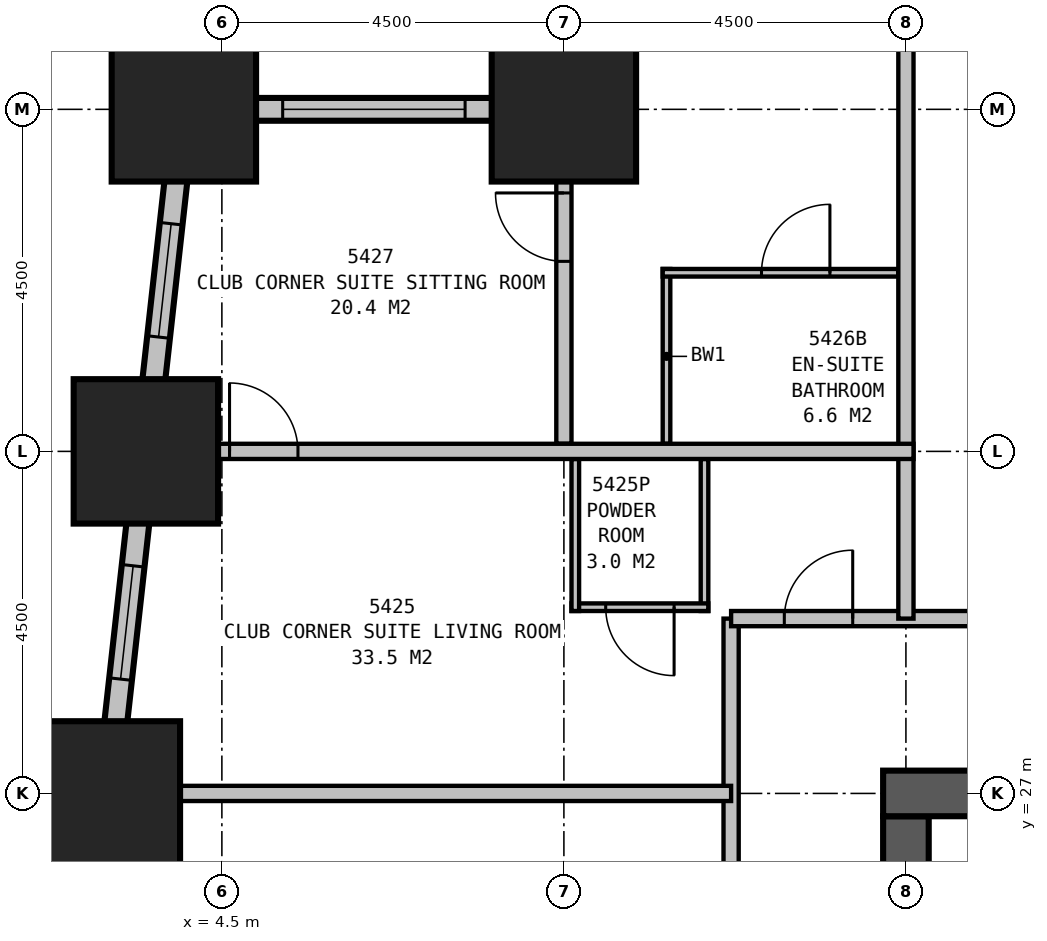
"""IFC4 building model, lengths in metres.
Left out: names, types, materials, properties, quantities, classifications, styles, units other than length and angle.
Written with IfcOpenShell. Run it as: python <this file> out.ifc"""

import sys

from ifc_helpers import new_model, si_unit, direction, frame, frame_2d, origin, origin_2d, place, context, subcontext, project, spatial, rectangle, extrude, element, fill, save


model = new_model("IFC4")
c1 = context("Model", 3, precision=1e-05, world=origin(), true_north=direction((0.0, 1.0)))
c2 = subcontext(c1, "Body", "Model", "MODEL_VIEW")
j1 = project(units=[si_unit("LENGTHUNIT", "METRE"), si_unit("PLANEANGLEUNIT", "RADIAN")], contexts=[c1])
p1 = place(None, origin())
s1 = spatial("IfcSite", under=j1, at=p1, CompositionType="ELEMENT")
p2 = place(p1, origin())
s2 = spatial("IfcBuilding", under=s1, at=p2, CompositionType="ELEMENT")
p3 = place(p2, frame((0.0, 0.0, 207.9)))
s3 = spatial("IfcBuildingStorey", under=s2, at=p3, CompositionType="ELEMENT", Elevation=207.9)
for number, where, z_axis, x_axis in (
    (1, (9.0, 36.0, 0.0), (0.0, 0.0, 1.0), (1.0, 0.0, 0.0)),
    (2, (4.0, 36.0, 0.0), (0.0, 0.0, 1.0), (1.0, 0.0, 0.0)),
    (3, (3.5, 31.5, 0.0), (0.0, 0.0, 1.0), (1.0, 0.0, 0.0)),
    (4, (3.0, 27.0, 0.0), (0.0, 0.0, 1.0), (1.0, 0.0, 0.0)),
):
    element("IfcColumn", number, at=place(p3, frame(where, z_axis=z_axis, x_axis=x_axis)), inside=s3, PredefinedType="COLUMN", context=c2, shape_type="SweptSolid", body=[
        extrude(rectangle(XDim=1.9, YDim=1.9, at=origin_2d()), origin(), (0.0, 0.0, 1.0), 3.5),
    ])
p4 = place(p3, frame((36.3, 27.0, 0.0), z_axis=(0.0, 0.0, 1.0), x_axis=(-1.0, 0.0, 0.0)))
e5 = element("IfcWall", 5, at=p4, inside=s3, PredefinedType="SHEAR", context=c2, shape_type="SweptSolid", body=[
    extrude(rectangle(XDim=23.1, YDim=0.6, at=frame_2d((11.55, 0.0))), origin(), (0.0, 0.0, 1.0), 3.5),
])
p5 = place(p4, frame((17.05, 0.0, 0.0)))
e6 = element("IfcOpeningElement", 6, at=p5, cuts=e5, PredefinedType="OPENING", context=c2, shape_type="SweptSolid", body=[
    extrude(rectangle(XDim=1.0, YDim=2.1, at=frame_2d((0.5, 1.05))), frame((0.0, 0.31, 0.0), z_axis=(0.0, -1.0, 0.0), x_axis=(1.0, 0.0, 0.0)), (0.0, 0.0, 1.0), 0.62),
])
p6 = place(p4, frame((12.05, 0.0, 0.0)))
e7 = element("IfcOpeningElement", 7, at=p6, cuts=e5, PredefinedType="OPENING", context=c2, shape_type="SweptSolid", body=[
    extrude(rectangle(XDim=1.0, YDim=2.1, at=frame_2d((0.5, 1.05))), frame((0.0, 0.31, 0.0), z_axis=(0.0, -1.0, 0.0), x_axis=(1.0, 0.0, 0.0)), (0.0, 0.0, 1.0), 0.62),
])
p7 = place(p4, frame((7.05, 0.0, 0.0)))
e8 = element("IfcOpeningElement", 8, at=p7, cuts=e5, PredefinedType="OPENING", context=c2, shape_type="SweptSolid", body=[
    extrude(rectangle(XDim=1.0, YDim=2.1, at=frame_2d((0.5, 1.05))), frame((0.0, 0.31, 0.0), z_axis=(0.0, -1.0, 0.0), x_axis=(1.0, 0.0, 0.0)), (0.0, 0.0, 1.0), 0.62),
])
p8 = place(p3, frame((13.5, 26.7, 0.0), z_axis=(0.0, 0.0, 1.0), x_axis=(0.0, -1.0, 0.0)))
e9 = element("IfcWall", 9, at=p8, inside=s3, PredefinedType="SHEAR", context=c2, shape_type="SweptSolid", body=[
    extrude(rectangle(XDim=6.7, YDim=0.6, at=frame_2d((3.35, 0.0))), origin(), (0.0, 0.0, 1.0), 3.5),
])
p9 = place(p3, frame((9.0, 40.65, 0.0), z_axis=(0.0, 0.0, 1.0), x_axis=(0.0, -1.0, 0.0)))
e10 = element("IfcWall", 10, at=p9, inside=s3, PredefinedType="STANDARD", context=c2, shape_type="SweptSolid", body=[
    extrude(rectangle(XDim=4.8, YDim=0.3, at=frame_2d((2.4, 0.0))), origin(), (0.0, 0.0, 1.0), 1.9),
])
p10 = place(p9, frame((1.65, 0.0, 0.5)))
e11 = element("IfcOpeningElement", 11, at=p10, cuts=e10, PredefinedType="OPENING", context=c2, shape_type="SweptSolid", body=[
    extrude(rectangle(XDim=1.5, YDim=1.2, at=frame_2d((0.75, 0.6))), frame((0.0, 0.16, 0.0), z_axis=(0.0, -1.0, 0.0), x_axis=(1.0, 0.0, 0.0)), (0.0, 0.0, 1.0), 0.32),
])
p11 = place(p3, frame((9.15, 36.0, 0.0), z_axis=(0.0, 0.0, 1.0), x_axis=(-1.0, 0.0, 0.0)))
e12 = element("IfcWall", 12, at=p11, inside=s3, PredefinedType="STANDARD", context=c2, shape_type="SweptSolid", body=[
    extrude(rectangle(XDim=5.3, YDim=0.3, at=frame_2d((2.65, 0.0))), origin(), (0.0, 0.0, 1.0), 1.9),
])
p12 = place(p11, frame((1.45, 0.0, 0.5)))
e13 = element("IfcOpeningElement", 13, at=p12, cuts=e12, PredefinedType="OPENING", context=c2, shape_type="SweptSolid", body=[
    extrude(rectangle(XDim=2.4, YDim=1.2, at=frame_2d((1.2, 0.6))), frame((0.0, 0.16, 0.0), z_axis=(0.0, -1.0, 0.0), x_axis=(1.0, 0.0, 0.0)), (0.0, 0.0, 1.0), 0.32),
])
p13 = place(p3, frame((4.017, 36.149, 0.0), z_axis=(0.0, 0.0, 1.0), x_axis=(-0.110433862387, -0.993883475081, 0.0)))
e14 = element("IfcWall", 14, at=p13, inside=s3, PredefinedType="STANDARD", context=c2, shape_type="SweptSolid", body=[
    extrude(rectangle(XDim=22.939, YDim=0.3, at=frame_2d((11.469, 0.0))), origin(), (0.0, 0.0, 1.0), 1.9),
])
p14 = place(p13, frame((1.664, 0.0, 0.5)))
e15 = element("IfcOpeningElement", 15, at=p14, cuts=e14, PredefinedType="OPENING", context=c2, shape_type="SweptSolid", body=[
    extrude(rectangle(XDim=1.5, YDim=1.2, at=frame_2d((0.75, 0.6))), frame((0.0, 0.16, 0.0), z_axis=(0.0, -1.0, 0.0), x_axis=(1.0, 0.0, 0.0)), (0.0, 0.0, 1.0), 0.32),
])
p15 = place(p13, frame((6.192, 0.0, 0.5)))
e16 = element("IfcOpeningElement", 16, at=p15, cuts=e14, PredefinedType="OPENING", context=c2, shape_type="SweptSolid", body=[
    extrude(rectangle(XDim=1.5, YDim=1.2, at=frame_2d((0.75, 0.6))), frame((0.0, 0.16, 0.0), z_axis=(0.0, -1.0, 0.0), x_axis=(1.0, 0.0, 0.0)), (0.0, 0.0, 1.0), 0.32),
])
p16 = place(p13, frame((10.719, 0.0, 0.5)))
e17 = element("IfcOpeningElement", 17, at=p16, cuts=e14, PredefinedType="OPENING", context=c2, shape_type="SweptSolid", body=[
    extrude(rectangle(XDim=1.5, YDim=1.2, at=frame_2d((0.75, 0.6))), frame((0.0, 0.16, 0.0), z_axis=(0.0, -1.0, 0.0), x_axis=(1.0, 0.0, 0.0)), (0.0, 0.0, 1.0), 0.32),
])
p17 = place(p13, frame((15.247, 0.0, 0.5)))
e18 = element("IfcOpeningElement", 18, at=p17, cuts=e14, PredefinedType="OPENING", context=c2, shape_type="SweptSolid", body=[
    extrude(rectangle(XDim=1.5, YDim=1.2, at=frame_2d((0.75, 0.6))), frame((0.0, 0.16, 0.0), z_axis=(0.0, -1.0, 0.0), x_axis=(1.0, 0.0, 0.0)), (0.0, 0.0, 1.0), 0.32),
])
p18 = place(p13, frame((19.775, 0.0, 0.5)))
e19 = element("IfcOpeningElement", 19, at=p18, cuts=e14, PredefinedType="OPENING", context=c2, shape_type="SweptSolid", body=[
    extrude(rectangle(XDim=1.5, YDim=1.2, at=frame_2d((0.75, 0.6))), frame((0.0, 0.16, 0.0), z_axis=(0.0, -1.0, 0.0), x_axis=(1.0, 0.0, 0.0)), (0.0, 0.0, 1.0), 0.32),
])
p19 = place(p3, frame((11.2, 29.3, 0.0), z_axis=(0.0, 0.0, 1.0), x_axis=(1.0, 0.0, 0.0)))
e20 = element("IfcWall", 20, at=p19, inside=s3, PredefinedType="PARTITIONING", context=c2, shape_type="SweptSolid", body=[
    extrude(rectangle(XDim=27.1, YDim=0.2, at=frame_2d((13.55, 0.0))), origin(), (0.0, 0.0, 1.0), 3.25),
])
p20 = place(p19, frame((3.15, 0.0, 0.0)))
e21 = element("IfcOpeningElement", 21, at=p20, cuts=e20, PredefinedType="OPENING", context=c2, shape_type="SweptSolid", body=[
    extrude(rectangle(XDim=0.9, YDim=2.1, at=frame_2d((0.45, 1.05))), frame((0.0, 0.11, 0.0), z_axis=(0.0, -1.0, 0.0), x_axis=(1.0, 0.0, 0.0)), (0.0, 0.0, 1.0), 0.22),
])
p21 = place(p19, frame((16.65, 0.0, 0.0)))
e22 = element("IfcOpeningElement", 22, at=p21, cuts=e20, PredefinedType="OPENING", context=c2, shape_type="SweptSolid", body=[
    extrude(rectangle(XDim=0.9, YDim=2.1, at=frame_2d((0.45, 1.05))), frame((0.0, 0.11, 0.0), z_axis=(0.0, -1.0, 0.0), x_axis=(1.0, 0.0, 0.0)), (0.0, 0.0, 1.0), 0.22),
])
p22 = place(p19, frame((25.5, 0.0, 0.0)))
e23 = element("IfcOpeningElement", 23, at=p22, cuts=e20, PredefinedType="OPENING", context=c2, shape_type="SweptSolid", body=[
    extrude(rectangle(XDim=0.9, YDim=2.1, at=frame_2d((0.45, 1.05))), frame((0.0, 0.11, 0.0), z_axis=(0.0, -1.0, 0.0), x_axis=(1.0, 0.0, 0.0)), (0.0, 0.0, 1.0), 0.22),
])
p23 = place(p19, frame((0.7, 0.0, 0.0)))
e24 = element("IfcOpeningElement", 24, at=p23, cuts=e20, PredefinedType="OPENING", context=c2, shape_type="SweptSolid", body=[
    extrude(rectangle(XDim=0.9, YDim=2.1, at=frame_2d((0.45, 1.05))), frame((0.0, 0.11, 0.0), z_axis=(0.0, -1.0, 0.0), x_axis=(1.0, 0.0, 0.0)), (0.0, 0.0, 1.0), 0.22),
])
p24 = place(p3, frame((11.2, 10.6, 0.0), z_axis=(0.0, 0.0, 1.0), x_axis=(0.0, 1.0, 0.0)))
e25 = element("IfcWall", 25, at=p24, inside=s3, PredefinedType="PARTITIONING", context=c2, shape_type="SweptSolid", body=[
    extrude(rectangle(XDim=18.7, YDim=0.2, at=frame_2d((9.35, 0.0))), origin(), (0.0, 0.0, 1.0), 3.25),
])
p25 = place(p24, frame((4.6, 0.0, 0.0)))
e26 = element("IfcOpeningElement", 26, at=p25, cuts=e25, PredefinedType="OPENING", context=c2, shape_type="SweptSolid", body=[
    extrude(rectangle(XDim=1.0, YDim=2.1, at=frame_2d((0.5, 1.05))), frame((0.0, 0.11, 0.0), z_axis=(0.0, -1.0, 0.0), x_axis=(1.0, 0.0, 0.0)), (0.0, 0.0, 1.0), 0.22),
])
p26 = place(p24, frame((9.05, 0.0, 0.0)))
e27 = element("IfcOpeningElement", 27, at=p26, cuts=e25, PredefinedType="OPENING", context=c2, shape_type="SweptSolid", body=[
    extrude(rectangle(XDim=0.9, YDim=2.1, at=frame_2d((0.45, 1.05))), frame((0.0, 0.11, 0.0), z_axis=(0.0, -1.0, 0.0), x_axis=(1.0, 0.0, 0.0)), (0.0, 0.0, 1.0), 0.22),
])
p27 = place(p3, frame((11.2, 27.0, 0.0), z_axis=(0.0, 0.0, 1.0), x_axis=(-1.0, 0.0, 0.0)))
e28 = element("IfcWall", 28, at=p27, inside=s3, PredefinedType="PARTITIONING", context=c2, shape_type="SweptSolid", body=[
    extrude(rectangle(XDim=7.977, YDim=0.2, at=frame_2d((3.988, 0.0))), origin(), (0.0, 0.0, 1.0), 1.9),
])
p28 = place(p3, frame((13.5, 29.3, 0.0), z_axis=(0.0, 0.0, 1.0), x_axis=(0.0, 1.0, 0.0)))
e29 = element("IfcWall", 29, at=p28, inside=s3, PredefinedType="PARTITIONING", context=c2, shape_type="SweptSolid", body=[
    extrude(rectangle(XDim=11.2, YDim=0.2, at=frame_2d((5.6, 0.0))), origin(), (0.0, 0.0, 1.0), 2.2),
])
p29 = place(p3, frame((13.6, 31.5, 0.0), z_axis=(0.0, 0.0, 1.0), x_axis=(-1.0, 0.0, 0.0)))
e30 = element("IfcWall", 30, at=p29, inside=s3, PredefinedType="PARTITIONING", context=c2, shape_type="SweptSolid", body=[
    extrude(rectangle(XDim=10.099, YDim=0.2, at=frame_2d((5.05, 0.0))), origin(), (0.0, 0.0, 1.0), 3.25),
])
p30 = place(p29, frame((8.999, 0.0, 0.0), z_axis=(0.0, 0.0, 1.0), x_axis=(-1.0, 0.0, 0.0)))
e31 = element("IfcOpeningElement", 31, at=p30, cuts=e30, PredefinedType="OPENING", context=c2, shape_type="SweptSolid", body=[
    extrude(rectangle(XDim=0.9, YDim=2.1, at=frame_2d((0.45, 1.05))), frame((0.0, 0.11, 0.0), z_axis=(0.0, -1.0, 0.0), x_axis=(1.0, 0.0, 0.0)), (0.0, 0.0, 1.0), 0.22),
])
p31 = place(p3, frame((9.15, 31.4, 0.0), z_axis=(0.0, 0.0, 1.0), x_axis=(0.0, -1.0, 0.0)))
e32 = element("IfcWall", 32, at=p31, inside=s3, PredefinedType="PLUMBINGWALL", context=c2, shape_type="SweptSolid", body=[
    extrude(rectangle(XDim=2.0, YDim=0.1, at=frame_2d((1.0, 0.0))), origin(), (0.0, 0.0, 1.0), 2.2),
])
p32 = place(p3, frame((10.85, 31.4, 0.0), z_axis=(0.0, 0.0, 1.0), x_axis=(0.0, -1.0, 0.0)))
e33 = element("IfcWall", 33, at=p32, inside=s3, PredefinedType="PLUMBINGWALL", context=c2, shape_type="SweptSolid", body=[
    extrude(rectangle(XDim=2.0, YDim=0.1, at=frame_2d((1.0, 0.0))), origin(), (0.0, 0.0, 1.0), 3.25),
])
p33 = place(p3, frame((10.9, 29.45, 0.0), z_axis=(0.0, 0.0, 1.0), x_axis=(-1.0, 0.0, 0.0)))
e34 = element("IfcWall", 34, at=p33, inside=s3, PredefinedType="PLUMBINGWALL", context=c2, shape_type="SweptSolid", body=[
    extrude(rectangle(XDim=1.8, YDim=0.1, at=frame_2d((0.9, 0.0))), origin(), (0.0, 0.0, 1.0), 3.25),
])
p34 = place(p33, frame((0.45, 0.0, 0.0)))
e35 = element("IfcOpeningElement", 35, at=p34, cuts=e34, PredefinedType="OPENING", context=c2, shape_type="SweptSolid", body=[
    extrude(rectangle(XDim=0.9, YDim=2.1, at=frame_2d((0.45, 1.05))), frame((0.0, 0.06, 0.0), z_axis=(0.0, -1.0, 0.0), x_axis=(1.0, 0.0, 0.0)), (0.0, 0.0, 1.0), 0.12),
])
p35 = place(p3, frame((9.0, 31.6, 0.0), z_axis=(0.0, 0.0, 1.0), x_axis=(0.0, 1.0, 0.0)))
e36 = element("IfcWall", 36, at=p35, inside=s3, PredefinedType="PARTITIONING", context=c2, shape_type="SweptSolid", body=[
    extrude(rectangle(XDim=4.4, YDim=0.2, at=frame_2d((2.2, 0.0))), origin(), (0.0, 0.0, 1.0), 2.2),
])
p36 = place(p35, frame((2.4, 0.0, 0.0)))
e37 = element("IfcOpeningElement", 37, at=p36, cuts=e36, PredefinedType="OPENING", context=c2, shape_type="SweptSolid", body=[
    extrude(rectangle(XDim=0.9, YDim=2.1, at=frame_2d((0.45, 1.05))), frame((0.0, 0.11, 0.0), z_axis=(0.0, -1.0, 0.0), x_axis=(1.0, 0.0, 0.0)), (0.0, 0.0, 1.0), 0.22),
])
p37 = place(p3, frame((10.35, 31.6, 0.0), z_axis=(0.0, 0.0, 1.0), x_axis=(0.0, 1.0, 0.0)))
e38 = element("IfcWall", 38, at=p37, inside=s3, PredefinedType="PLUMBINGWALL", context=c2, shape_type="SweptSolid", body=[
    extrude(rectangle(XDim=2.3, YDim=0.1, at=frame_2d((1.15, 0.0))), origin(), (0.0, 0.0, 1.0), 3.25),
])
p38 = place(p3, frame((13.4, 33.85, 0.0), z_axis=(0.0, 0.0, 1.0), x_axis=(-1.0, 0.0, 0.0)))
e39 = element("IfcWall", 39, at=p38, inside=s3, PredefinedType="PLUMBINGWALL", context=c2, shape_type="SweptSolid", body=[
    extrude(rectangle(XDim=3.1, YDim=0.1, at=frame_2d((1.55, 0.0))), origin(), (0.0, 0.0, 1.0), 3.25),
])
p39 = place(p38, frame((1.8, 0.0, 0.0), z_axis=(0.0, 0.0, 1.0), x_axis=(-1.0, 0.0, 0.0)))
e40 = element("IfcOpeningElement", 40, at=p39, cuts=e39, PredefinedType="OPENING", context=c2, shape_type="SweptSolid", body=[
    extrude(rectangle(XDim=0.9, YDim=2.1, at=frame_2d((0.45, 1.05))), frame((0.0, 0.06, 0.0), z_axis=(0.0, -1.0, 0.0), x_axis=(1.0, 0.0, 0.0)), (0.0, 0.0, 1.0), 0.12),
])
p40 = place(p12, origin())
e41 = element("IfcWindow", 41, at=p40, inside=s3, PartitioningType="SINGLE_PANEL", PredefinedType="WINDOW", context=c2, shape_type="SweptSolid", body=[
    extrude(rectangle(XDim=2.4, YDim=1.2, at=frame_2d((1.2, 0.6))), frame((0.0, 0.03, 0.0), z_axis=(0.0, -1.0, 0.0), x_axis=(1.0, 0.0, 0.0)), (0.0, 0.0, 1.0), 0.06),
])
fill(e13, e41)
p41 = place(p14, origin())
e42 = element("IfcWindow", 42, at=p41, inside=s3, PartitioningType="SINGLE_PANEL", PredefinedType="WINDOW", context=c2, shape_type="SweptSolid", body=[
    extrude(rectangle(XDim=1.5, YDim=1.2, at=frame_2d((0.75, 0.6))), frame((0.0, 0.03, 0.0), z_axis=(0.0, -1.0, 0.0), x_axis=(1.0, 0.0, 0.0)), (0.0, 0.0, 1.0), 0.06),
])
fill(e15, e42)
p42 = place(p15, origin())
e43 = element("IfcWindow", 43, at=p42, inside=s3, PartitioningType="SINGLE_PANEL", PredefinedType="WINDOW", context=c2, shape_type="SweptSolid", body=[
    extrude(rectangle(XDim=1.5, YDim=1.2, at=frame_2d((0.75, 0.6))), frame((0.0, 0.03, 0.0), z_axis=(0.0, -1.0, 0.0), x_axis=(1.0, 0.0, 0.0)), (0.0, 0.0, 1.0), 0.06),
])
fill(e16, e43)
p43 = place(p23, origin())
e44 = element("IfcDoor", 44, at=p43, inside=s3, OperationType="SINGLE_SWING_RIGHT", PredefinedType="DOOR", context=c2, shape_type="SweptSolid", body=[
    extrude(rectangle(XDim=0.9, YDim=2.1, at=frame_2d((0.45, 1.05))), frame((0.0, 0.025, 0.0), z_axis=(0.0, -1.0, 0.0), x_axis=(1.0, 0.0, 0.0)), (0.0, 0.0, 1.0), 0.05),
])
fill(e24, e44)
p44 = place(p30, origin())
e45 = element("IfcDoor", 45, at=p44, inside=s3, OperationType="SINGLE_SWING_LEFT", PredefinedType="DOOR", context=c2, shape_type="SweptSolid", body=[
    extrude(rectangle(XDim=0.9, YDim=2.1, at=frame_2d((0.45, 1.05))), frame((0.0, 0.025, 0.0), z_axis=(0.0, -1.0, 0.0), x_axis=(1.0, 0.0, 0.0)), (0.0, 0.0, 1.0), 0.05),
])
fill(e31, e45)
p45 = place(p34, origin())
e46 = element("IfcDoor", 46, at=p45, inside=s3, OperationType="SINGLE_SWING_LEFT", PredefinedType="DOOR", context=c2, shape_type="SweptSolid", body=[
    extrude(rectangle(XDim=0.9, YDim=2.1, at=frame_2d((0.45, 1.05))), frame((0.0, 0.025, 0.0), z_axis=(0.0, -1.0, 0.0), x_axis=(1.0, 0.0, 0.0)), (0.0, 0.0, 1.0), 0.05),
])
fill(e35, e46)
p46 = place(p36, origin())
e47 = element("IfcDoor", 47, at=p46, inside=s3, OperationType="SINGLE_SWING_RIGHT", PredefinedType="DOOR", context=c2, shape_type="SweptSolid", body=[
    extrude(rectangle(XDim=0.9, YDim=2.1, at=frame_2d((0.45, 1.05))), frame((0.0, 0.025, 0.0), z_axis=(0.0, -1.0, 0.0), x_axis=(1.0, 0.0, 0.0)), (0.0, 0.0, 1.0), 0.05),
])
fill(e37, e47)
p47 = place(p39, origin())
e48 = element("IfcDoor", 48, at=p47, inside=s3, OperationType="SINGLE_SWING_RIGHT", PredefinedType="DOOR", context=c2, shape_type="SweptSolid", body=[
    extrude(rectangle(XDim=0.9, YDim=2.1, at=frame_2d((0.45, 1.05))), frame((0.0, 0.025, 0.0), z_axis=(0.0, -1.0, 0.0), x_axis=(1.0, 0.0, 0.0)), (0.0, 0.0, 1.0), 0.05),
])
fill(e40, e48)
save(model, sys.argv[1])
